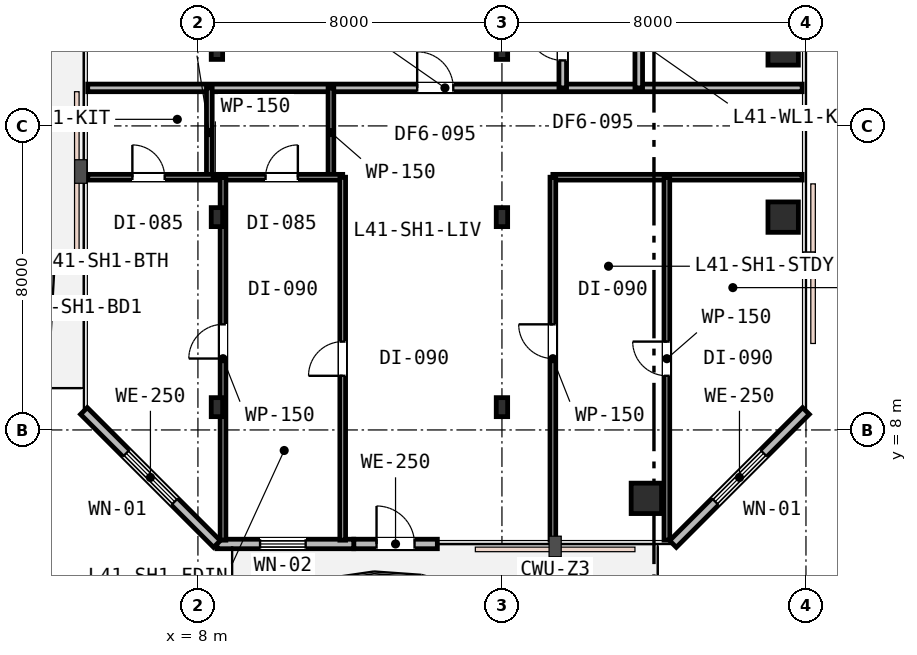
"""IFC4 building model, lengths in metres.
Left out: names, types, materials, properties, quantities, classifications, styles, units other than length and angle.
Written with IfcOpenShell. Run it as: python <this file> out.ifc"""

import sys

from ifc_helpers import new_model, si_unit, direction, frame, frame_2d, origin, origin_2d, place, context, subcontext, project, spatial, rectangle, i_section, extrude, element, fill, save


model = new_model("IFC4")
c1 = context("Model", 3, precision=1e-05, world=origin(), true_north=direction((0.0, 1.0)))
c2 = subcontext(c1, "Body", "Model", "MODEL_VIEW")
j1 = project(units=[si_unit("LENGTHUNIT", "METRE"), si_unit("PLANEANGLEUNIT", "RADIAN")], contexts=[c1])
p1 = place(None, origin())
s1 = spatial("IfcSite", under=j1, at=p1, CompositionType="ELEMENT")
p2 = place(p1, origin())
s2 = spatial("IfcBuilding", under=s1, at=p2, CompositionType="ELEMENT")
p3 = place(p2, frame((0.0, 0.0, 161.4)))
s3 = spatial("IfcBuildingStorey", under=s2, at=p3, CompositionType="ELEMENT", Elevation=161.4)
for number, where, z_axis, x_axis in (
    (1, (19.8, 6.2, 0.0), (0.0, 0.0, 1.0), (1.0, 0.0, 0.0)),
    (2, (23.4, 13.6, 0.0), (0.0, 0.0, 1.0), (1.0, 0.0, 0.0)),
    (3, (23.4, 18.0, 0.0), (0.0, 0.0, 1.0), (1.0, 0.0, 0.0)),
):
    element("IfcColumn", number, at=place(p3, frame(where, z_axis=z_axis, x_axis=x_axis)), inside=s3, PredefinedType="COLUMN", context=c2, shape_type="SweptSolid", body=[
        extrude(rectangle(XDim=0.8, YDim=0.8, at=origin_2d()), origin(), (0.0, 0.0, 1.0), 3.6),
    ])
for number, where, z_axis, x_axis in (
    (4, (8.5, 8.6, 0.0), (0.0, 0.0, 1.0), (1.0, 0.0, 0.0)),
    (5, (16.0, 8.6, 0.0), (0.0, 0.0, 1.0), (1.0, 0.0, 0.0)),
    (6, (8.5, 13.6, 0.0), (0.0, 0.0, 1.0), (1.0, 0.0, 0.0)),
    (7, (16.0, 13.6, 0.0), (0.0, 0.0, 1.0), (1.0, 0.0, 0.0)),
    (8, (8.5, 18.0, 0.0), (0.0, 0.0, 1.0), (1.0, 0.0, 0.0)),
    (9, (16.0, 18.0, 0.0), (0.0, 0.0, 1.0), (1.0, 0.0, 0.0)),
):
    element("IfcColumn", number, at=place(p3, frame(where, z_axis=z_axis, x_axis=x_axis)), inside=s3, PredefinedType="COLUMN", context=c2, shape_type="SweptSolid", body=[
        extrude(i_section(OverallWidth=0.3, OverallDepth=0.5, WebThickness=0.015, FlangeThickness=0.028, FilletRadius=0.027, at=origin_2d()), origin(), (0.0, 0.0, 1.0), 3.6),
    ])
p4 = place(p3, frame((12.1, 5.0, 0.0), z_axis=(0.0, 0.0, 1.0), x_axis=(1.0, 0.0, 0.0)))
e10 = element("IfcWall", 10, at=p4, inside=s3, PredefinedType="STANDARD", context=c2, shape_type="SweptSolid", body=[
    extrude(rectangle(XDim=2.2, YDim=0.25, at=frame_2d((1.1, 0.0))), origin(), (0.0, 0.0, 1.0), 3.33),
])
p5 = place(p4, frame((0.6, 0.0, 0.0)))
e11 = element("IfcOpeningElement", 11, at=p5, cuts=e10, PredefinedType="OPENING", context=c2, shape_type="SweptSolid", body=[
    extrude(rectangle(XDim=1.0, YDim=2.15, at=frame_2d((0.5, 1.075))), frame((0.0, 0.135, 0.0), z_axis=(0.0, -1.0, 0.0), x_axis=(1.0, 0.0, 0.0)), (0.0, 0.0, 1.0), 0.27),
])
p6 = place(p3, frame((8.5, 5.0, 0.0), z_axis=(0.0, 0.0, 1.0), x_axis=(1.0, 0.0, 0.0)))
e12 = element("IfcWall", 12, at=p6, inside=s3, PredefinedType="STANDARD", context=c2, shape_type="SweptSolid", body=[
    extrude(rectangle(XDim=3.6, YDim=0.25, at=frame_2d((1.8, 0.0))), origin(), (0.0, 0.0, 1.0), 3.33),
])
p7 = place(p6, frame((1.135, 0.0, 0.85)))
e13 = element("IfcOpeningElement", 13, at=p7, cuts=e12, PredefinedType="OPENING", context=c2, shape_type="SweptSolid", body=[
    extrude(rectangle(XDim=1.2, YDim=1.6, at=frame_2d((0.6, 0.8))), frame((0.0, 0.135, 0.0), z_axis=(0.0, -1.0, 0.0), x_axis=(1.0, 0.0, 0.0)), (0.0, 0.0, 1.0), 0.27),
])
p8 = place(p3, frame((20.5, 5.0, 0.0), z_axis=(0.0, 0.0, 1.0), x_axis=(0.707106781187, 0.707106781187, 0.0)))
e14 = element("IfcWall", 14, at=p8, inside=s3, PredefinedType="STANDARD", context=c2, shape_type="SweptSolid", body=[
    extrude(rectangle(XDim=4.95, YDim=0.25, at=frame_2d((2.475, 0.0))), origin(), (0.0, 0.0, 1.0), 3.33),
])
p9 = place(p8, frame((1.575, 0.0, 0.75)))
e15 = element("IfcOpeningElement", 15, at=p9, cuts=e14, PredefinedType="OPENING", context=c2, shape_type="SweptSolid", body=[
    extrude(rectangle(XDim=1.8, YDim=1.85, at=frame_2d((0.9, 0.925))), frame((0.0, 0.135, 0.0), z_axis=(0.0, -1.0, 0.0), x_axis=(1.0, 0.0, 0.0)), (0.0, 0.0, 1.0), 0.27),
])
p10 = place(p3, frame((5.0, 8.5, 0.0), z_axis=(0.0, 0.0, 1.0), x_axis=(0.707106781187, -0.707106781187, 0.0)))
e16 = element("IfcWall", 16, at=p10, inside=s3, PredefinedType="STANDARD", context=c2, shape_type="SweptSolid", body=[
    extrude(rectangle(XDim=4.95, YDim=0.25, at=frame_2d((2.475, 0.0))), origin(), (0.0, 0.0, 1.0), 3.33),
])
p11 = place(p10, frame((1.575, 0.0, 0.75)))
e17 = element("IfcOpeningElement", 17, at=p11, cuts=e16, PredefinedType="OPENING", context=c2, shape_type="SweptSolid", body=[
    extrude(rectangle(XDim=1.8, YDim=1.85, at=frame_2d((0.9, 0.925))), frame((0.0, 0.135, 0.0), z_axis=(0.0, -1.0, 0.0), x_axis=(1.0, 0.0, 0.0)), (0.0, 0.0, 1.0), 0.27),
])
p12 = place(p3, frame((5.1, 17.0, 0.0), z_axis=(0.0, 0.0, 1.0), x_axis=(1.0, 0.0, 0.0)))
e18 = element("IfcWall", 18, at=p12, inside=s3, PredefinedType="PARTITIONING", context=c2, shape_type="SweptSolid", body=[
    extrude(rectangle(XDim=18.8, YDim=0.2, at=frame_2d((9.4, 0.0))), origin(), (0.0, 0.0, 1.0), 2.93),
])
p13 = place(p12, frame((8.669, 0.0, 0.0)))
e19 = element("IfcOpeningElement", 19, at=p13, cuts=e18, PredefinedType="OPENING", context=c2, shape_type="SweptSolid", body=[
    extrude(rectangle(XDim=0.95, YDim=2.15, at=frame_2d((0.475, 1.075))), frame((0.0, 0.11, 0.0), z_axis=(0.0, -1.0, 0.0), x_axis=(1.0, 0.0, 0.0)), (0.0, 0.0, 1.0), 0.22),
])
p14 = place(p3, frame((17.6, 17.0, 0.0), z_axis=(0.0, 0.0, 1.0), x_axis=(0.0, 1.0, 0.0)))
e20 = element("IfcWall", 20, at=p14, inside=s3, PredefinedType="PARTITIONING", context=c2, shape_type="SweptSolid", body=[
    extrude(rectangle(XDim=11.6, YDim=0.2, at=frame_2d((5.8, 0.0))), origin(), (0.0, 0.0, 1.0), 2.93),
])
p15 = place(p14, frame((0.723, 0.0, 0.0)))
e21 = element("IfcOpeningElement", 21, at=p15, cuts=e20, PredefinedType="OPENING", context=c2, shape_type="SweptSolid", body=[
    extrude(rectangle(XDim=0.95, YDim=2.15, at=frame_2d((0.475, 1.075))), frame((0.0, 0.11, 0.0), z_axis=(0.0, -1.0, 0.0), x_axis=(1.0, 0.0, 0.0)), (0.0, 0.0, 1.0), 0.22),
])
p16 = place(p3, frame((19.6, 17.0, 0.0), z_axis=(0.0, 0.0, 1.0), x_axis=(0.0, 1.0, 0.0)))
e22 = element("IfcWall", 22, at=p16, inside=s3, PredefinedType="PARTITIONING", context=c2, shape_type="SweptSolid", body=[
    extrude(rectangle(XDim=11.6, YDim=0.2, at=frame_2d((5.8, 0.0))), origin(), (0.0, 0.0, 1.0), 2.93),
])
p17 = place(p16, frame((3.125, 0.0, 0.0)))
e23 = element("IfcOpeningElement", 23, at=p17, cuts=e22, PredefinedType="OPENING", context=c2, shape_type="SweptSolid", body=[
    extrude(rectangle(XDim=0.95, YDim=2.15, at=frame_2d((0.475, 1.075))), frame((0.0, 0.11, 0.0), z_axis=(0.0, -1.0, 0.0), x_axis=(1.0, 0.0, 0.0)), (0.0, 0.0, 1.0), 0.22),
])
p18 = place(p3, frame((11.5, 14.65, 0.0), z_axis=(0.0, 0.0, 1.0), x_axis=(0.0, 1.0, 0.0)))
e24 = element("IfcWall", 24, at=p18, inside=s3, PredefinedType="PARTITIONING", context=c2, shape_type="SweptSolid", body=[
    extrude(rectangle(XDim=2.35, YDim=0.15, at=frame_2d((1.175, 0.0))), origin(), (0.0, 0.0, 1.0), 2.96),
])
p19 = place(p3, frame((8.3, 14.65, 0.0), z_axis=(0.0, 0.0, 1.0), x_axis=(0.0, 1.0, 0.0)))
e25 = element("IfcWall", 25, at=p19, inside=s3, PredefinedType="PARTITIONING", context=c2, shape_type="SweptSolid", body=[
    extrude(rectangle(XDim=2.35, YDim=0.15, at=frame_2d((1.175, 0.0))), origin(), (0.0, 0.0, 1.0), 2.93),
])
p20 = place(p3, frame((5.1, 14.65, 0.0), z_axis=(0.0, 0.0, 1.0), x_axis=(1.0, 0.0, 0.0)))
e26 = element("IfcWall", 26, at=p20, inside=s3, PredefinedType="PARTITIONING", context=c2, shape_type="SweptSolid", body=[
    extrude(rectangle(XDim=6.71, YDim=0.15, at=frame_2d((3.355, 0.0))), origin(), (0.0, 0.0, 1.0), 2.93),
])
p21 = place(p20, frame((1.175, 0.0, 0.0)))
e27 = element("IfcOpeningElement", 27, at=p21, cuts=e26, PredefinedType="OPENING", context=c2, shape_type="SweptSolid", body=[
    extrude(rectangle(XDim=0.85, YDim=2.15, at=frame_2d((0.425, 1.075))), frame((0.0, 0.085, 0.0), z_axis=(0.0, -1.0, 0.0), x_axis=(1.0, 0.0, 0.0)), (0.0, 0.0, 1.0), 0.17),
])
p22 = place(p20, frame((4.679, 0.0, 0.0)))
e28 = element("IfcOpeningElement", 28, at=p22, cuts=e26, PredefinedType="OPENING", context=c2, shape_type="SweptSolid", body=[
    extrude(rectangle(XDim=0.85, YDim=2.15, at=frame_2d((0.425, 1.075))), frame((0.0, 0.085, 0.0), z_axis=(0.0, -1.0, 0.0), x_axis=(1.0, 0.0, 0.0)), (0.0, 0.0, 1.0), 0.17),
])
p23 = place(p3, frame((17.34, 14.65, 0.0), z_axis=(0.0, 0.0, 1.0), x_axis=(1.0, 0.0, 0.0)))
e29 = element("IfcWall", 29, at=p23, inside=s3, PredefinedType="PARTITIONING", context=c2, shape_type="SweptSolid", body=[
    extrude(rectangle(XDim=6.56, YDim=0.15, at=frame_2d((3.28, 0.0))), origin(), (0.0, 0.0, 1.0), 2.96),
])
p24 = place(p3, frame((8.66, 5.1, 0.0), z_axis=(0.0, 0.0, 1.0), x_axis=(0.0, 1.0, 0.0)))
e30 = element("IfcWall", 30, at=p24, inside=s3, PredefinedType="PARTITIONING", context=c2, shape_type="SweptSolid", body=[
    extrude(rectangle(XDim=9.55, YDim=0.15, at=frame_2d((4.775, 0.0))), origin(), (0.0, 0.0, 1.0), 2.93),
])
p25 = place(p24, frame((4.779, 0.0, 0.0)))
e31 = element("IfcOpeningElement", 31, at=p25, cuts=e30, PredefinedType="OPENING", context=c2, shape_type="SweptSolid", body=[
    extrude(rectangle(XDim=0.9, YDim=2.15, at=frame_2d((0.45, 1.075))), frame((0.0, 0.085, 0.0), z_axis=(0.0, -1.0, 0.0), x_axis=(1.0, 0.0, 0.0)), (0.0, 0.0, 1.0), 0.17),
])
p26 = place(p3, frame((20.34, 5.1, 0.0), z_axis=(0.0, 0.0, 1.0), x_axis=(0.0, 1.0, 0.0)))
e32 = element("IfcWall", 32, at=p26, inside=s3, PredefinedType="PARTITIONING", context=c2, shape_type="SweptSolid", body=[
    extrude(rectangle(XDim=9.55, YDim=0.15, at=frame_2d((4.775, 0.0))), origin(), (0.0, 0.0, 1.0), 2.93),
])
p27 = place(p26, frame((4.325, 0.0, 0.0)))
e33 = element("IfcOpeningElement", 33, at=p27, cuts=e32, PredefinedType="OPENING", context=c2, shape_type="SweptSolid", body=[
    extrude(rectangle(XDim=0.9, YDim=2.15, at=frame_2d((0.45, 1.075))), frame((0.0, 0.085, 0.0), z_axis=(0.0, -1.0, 0.0), x_axis=(1.0, 0.0, 0.0)), (0.0, 0.0, 1.0), 0.17),
])
p28 = place(p3, frame((17.34, 5.1, 0.0), z_axis=(0.0, 0.0, 1.0), x_axis=(0.0, 1.0, 0.0)))
e34 = element("IfcWall", 34, at=p28, inside=s3, PredefinedType="PARTITIONING", context=c2, shape_type="SweptSolid", body=[
    extrude(rectangle(XDim=9.55, YDim=0.15, at=frame_2d((4.775, 0.0))), origin(), (0.0, 0.0, 1.0), 2.93),
])
p29 = place(p28, frame((4.779, 0.0, 0.0)))
e35 = element("IfcOpeningElement", 35, at=p29, cuts=e34, PredefinedType="OPENING", context=c2, shape_type="SweptSolid", body=[
    extrude(rectangle(XDim=0.9, YDim=2.15, at=frame_2d((0.45, 1.075))), frame((0.0, 0.085, 0.0), z_axis=(0.0, -1.0, 0.0), x_axis=(1.0, 0.0, 0.0)), (0.0, 0.0, 1.0), 0.17),
])
p30 = place(p3, frame((11.81, 5.1, 0.0), z_axis=(0.0, 0.0, 1.0), x_axis=(0.0, 1.0, 0.0)))
e36 = element("IfcWall", 36, at=p30, inside=s3, PredefinedType="PARTITIONING", context=c2, shape_type="SweptSolid", body=[
    extrude(rectangle(XDim=9.55, YDim=0.15, at=frame_2d((4.775, 0.0))), origin(), (0.0, 0.0, 1.0), 2.93),
])
p31 = place(p30, frame((4.325, 0.0, 0.0)))
e37 = element("IfcOpeningElement", 37, at=p31, cuts=e36, PredefinedType="OPENING", context=c2, shape_type="SweptSolid", body=[
    extrude(rectangle(XDim=0.9, YDim=2.15, at=frame_2d((0.45, 1.075))), frame((0.0, 0.085, 0.0), z_axis=(0.0, -1.0, 0.0), x_axis=(1.0, 0.0, 0.0)), (0.0, 0.0, 1.0), 0.17),
])
p32 = place(p5, origin())
e38 = element("IfcDoor", 38, at=p32, inside=s3, OperationType="SINGLE_SWING_LEFT", PredefinedType="DOOR", context=c2, shape_type="SweptSolid", body=[
    extrude(rectangle(XDim=1.0, YDim=2.15, at=frame_2d((0.5, 1.075))), frame((0.0, 0.025, 0.0), z_axis=(0.0, -1.0, 0.0), x_axis=(1.0, 0.0, 0.0)), (0.0, 0.0, 1.0), 0.05),
])
fill(e11, e38)
p33 = place(p7, origin())
e39 = element("IfcWindow", 39, at=p33, inside=s3, PartitioningType="SINGLE_PANEL", PredefinedType="WINDOW", context=c2, shape_type="SweptSolid", body=[
    extrude(rectangle(XDim=1.2, YDim=1.6, at=frame_2d((0.6, 0.8))), frame((0.0, 0.03, 0.0), z_axis=(0.0, -1.0, 0.0), x_axis=(1.0, 0.0, 0.0)), (0.0, 0.0, 1.0), 0.06),
])
fill(e13, e39)
p34 = place(p9, origin())
e40 = element("IfcWindow", 40, at=p34, inside=s3, PartitioningType="SINGLE_PANEL", PredefinedType="WINDOW", context=c2, shape_type="SweptSolid", body=[
    extrude(rectangle(XDim=1.8, YDim=1.85, at=frame_2d((0.9, 0.925))), frame((0.0, 0.03, 0.0), z_axis=(0.0, -1.0, 0.0), x_axis=(1.0, 0.0, 0.0)), (0.0, 0.0, 1.0), 0.06),
])
fill(e15, e40)
p35 = place(p11, origin())
e41 = element("IfcWindow", 41, at=p35, inside=s3, PartitioningType="SINGLE_PANEL", PredefinedType="WINDOW", context=c2, shape_type="SweptSolid", body=[
    extrude(rectangle(XDim=1.8, YDim=1.85, at=frame_2d((0.9, 0.925))), frame((0.0, 0.03, 0.0), z_axis=(0.0, -1.0, 0.0), x_axis=(1.0, 0.0, 0.0)), (0.0, 0.0, 1.0), 0.06),
])
fill(e17, e41)
p36 = place(p15, origin())
e42 = element("IfcDoor", 42, at=p36, inside=s3, OperationType="SINGLE_SWING_RIGHT", PredefinedType="DOOR", context=c2, shape_type="SweptSolid", body=[
    extrude(rectangle(XDim=0.95, YDim=2.15, at=frame_2d((0.475, 1.075))), frame((0.0, 0.025, 0.0), z_axis=(0.0, -1.0, 0.0), x_axis=(1.0, 0.0, 0.0)), (0.0, 0.0, 1.0), 0.05),
])
fill(e21, e42)
p37 = place(p13, origin())
e43 = element("IfcDoor", 43, at=p37, inside=s3, OperationType="SINGLE_SWING_LEFT", PredefinedType="DOOR", context=c2, shape_type="SweptSolid", body=[
    extrude(rectangle(XDim=0.95, YDim=2.15, at=frame_2d((0.475, 1.075))), frame((0.0, 0.025, 0.0), z_axis=(0.0, -1.0, 0.0), x_axis=(1.0, 0.0, 0.0)), (0.0, 0.0, 1.0), 0.05),
])
fill(e19, e43)
p38 = place(p21, origin())
e44 = element("IfcDoor", 44, at=p38, inside=s3, OperationType="SINGLE_SWING_LEFT", PredefinedType="DOOR", context=c2, shape_type="SweptSolid", body=[
    extrude(rectangle(XDim=0.85, YDim=2.15, at=frame_2d((0.425, 1.075))), frame((0.0, 0.025, 0.0), z_axis=(0.0, -1.0, 0.0), x_axis=(1.0, 0.0, 0.0)), (0.0, 0.0, 1.0), 0.05),
])
fill(e27, e44)
p39 = place(p22, origin())
e45 = element("IfcDoor", 45, at=p39, inside=s3, OperationType="SINGLE_SWING_RIGHT", PredefinedType="DOOR", context=c2, shape_type="SweptSolid", body=[
    extrude(rectangle(XDim=0.85, YDim=2.15, at=frame_2d((0.425, 1.075))), frame((0.0, 0.025, 0.0), z_axis=(0.0, -1.0, 0.0), x_axis=(1.0, 0.0, 0.0)), (0.0, 0.0, 1.0), 0.05),
])
fill(e28, e45)
p40 = place(p25, origin())
e46 = element("IfcDoor", 46, at=p40, inside=s3, OperationType="SINGLE_SWING_LEFT", PredefinedType="DOOR", context=c2, shape_type="SweptSolid", body=[
    extrude(rectangle(XDim=0.9, YDim=2.15, at=frame_2d((0.45, 1.075))), frame((0.0, 0.025, 0.0), z_axis=(0.0, -1.0, 0.0), x_axis=(1.0, 0.0, 0.0)), (0.0, 0.0, 1.0), 0.05),
])
fill(e31, e46)
p41 = place(p27, origin())
e47 = element("IfcDoor", 47, at=p41, inside=s3, OperationType="SINGLE_SWING_RIGHT", PredefinedType="DOOR", context=c2, shape_type="SweptSolid", body=[
    extrude(rectangle(XDim=0.9, YDim=2.15, at=frame_2d((0.45, 1.075))), frame((0.0, 0.025, 0.0), z_axis=(0.0, -1.0, 0.0), x_axis=(1.0, 0.0, 0.0)), (0.0, 0.0, 1.0), 0.05),
])
fill(e33, e47)
p42 = place(p29, origin())
e48 = element("IfcDoor", 48, at=p42, inside=s3, OperationType="SINGLE_SWING_RIGHT", PredefinedType="DOOR", context=c2, shape_type="SweptSolid", body=[
    extrude(rectangle(XDim=0.9, YDim=2.15, at=frame_2d((0.45, 1.075))), frame((0.0, 0.025, 0.0), z_axis=(0.0, -1.0, 0.0), x_axis=(1.0, 0.0, 0.0)), (0.0, 0.0, 1.0), 0.05),
])
fill(e35, e48)
p43 = place(p31, origin())
e49 = element("IfcDoor", 49, at=p43, inside=s3, OperationType="SINGLE_SWING_LEFT", PredefinedType="DOOR", context=c2, shape_type="SweptSolid", body=[
    extrude(rectangle(XDim=0.9, YDim=2.15, at=frame_2d((0.45, 1.075))), frame((0.0, 0.025, 0.0), z_axis=(0.0, -1.0, 0.0), x_axis=(1.0, 0.0, 0.0)), (0.0, 0.0, 1.0), 0.05),
])
fill(e37, e49)
save(model, sys.argv[1])
